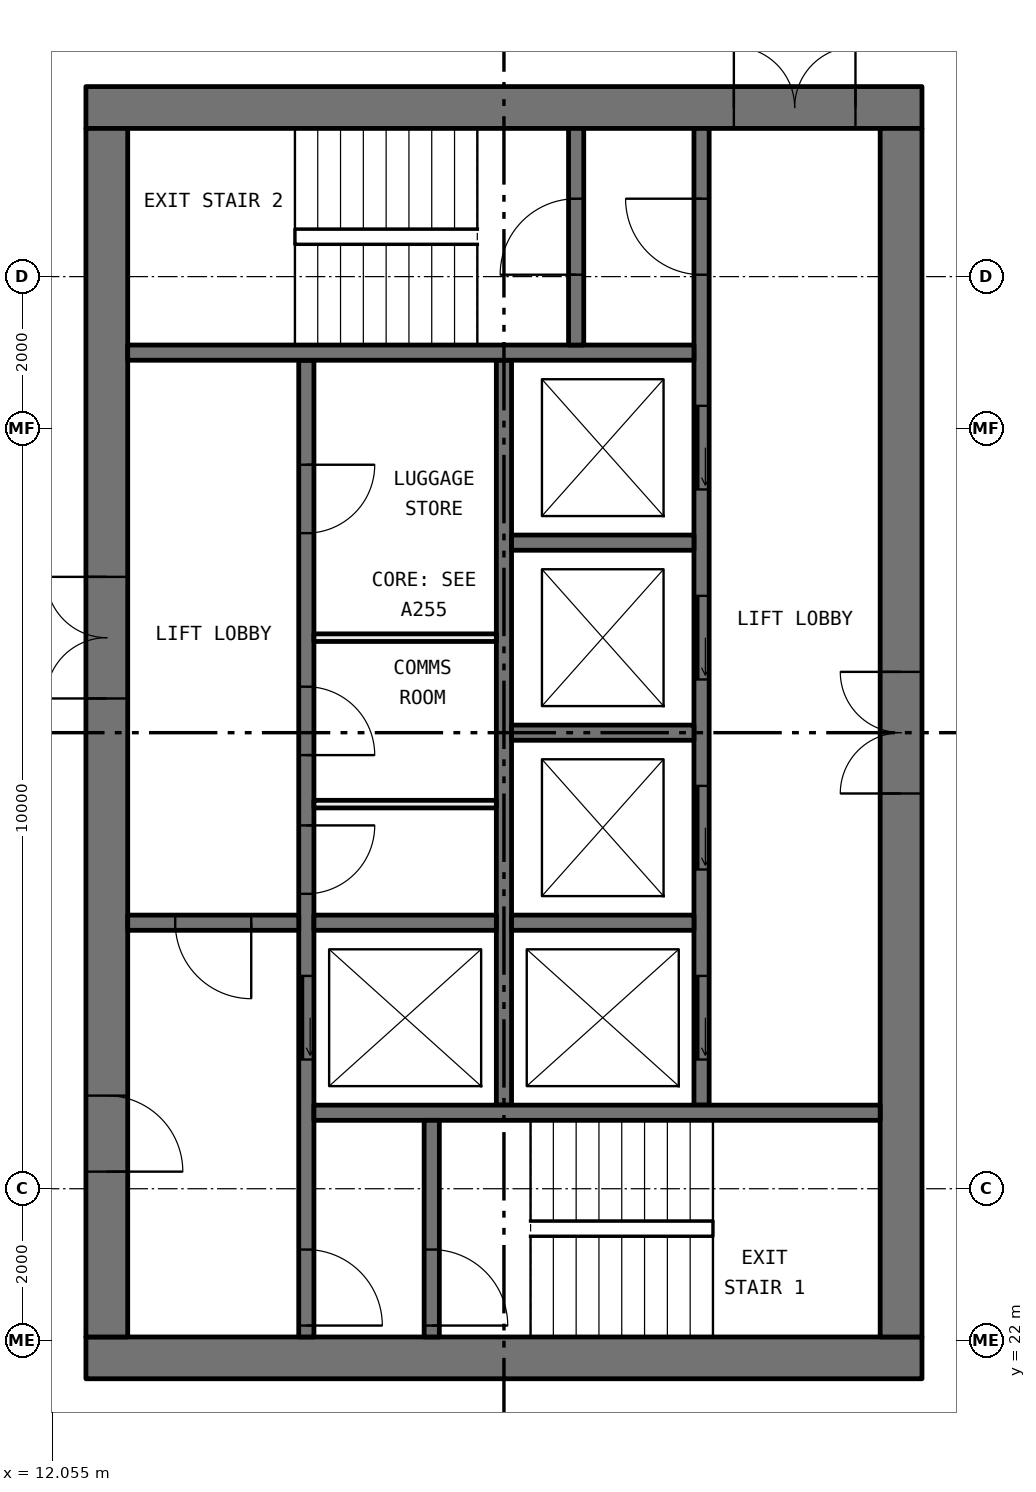
"""IFC4 building model, lengths in metres.
Left out: names, types, materials, properties, quantities, classifications, styles, units other than length and angle.
Written with IfcOpenShell. Run it as: python <this file> out.ifc"""

import sys

from ifc_helpers import new_model, si_unit, direction, frame, frame_2d, origin, place, context, subcontext, project, spatial, rectangle, extrude, element, fill, save


model = new_model("IFC4")
c1 = context("Model", 3, precision=1e-05, world=origin(), true_north=direction((0.0, 1.0)))
c2 = subcontext(c1, "Body", "Model", "MODEL_VIEW")
j1 = project(units=[si_unit("LENGTHUNIT", "METRE"), si_unit("PLANEANGLEUNIT", "RADIAN")], contexts=[c1])
p1 = place(None, origin())
s1 = spatial("IfcSite", under=j1, at=p1, CompositionType="ELEMENT")
p2 = place(p1, origin())
s2 = spatial("IfcBuilding", under=s1, at=p2, CompositionType="ELEMENT")
p3 = place(p2, frame((0.0, 0.0, 203.1)))
s3 = spatial("IfcBuildingStorey", under=s2, at=p3, CompositionType="ELEMENT", Elevation=203.1)
p4 = place(p3, frame((12.5, 21.775, 0.0), z_axis=(0.0, 0.0, 1.0), x_axis=(1.0, 0.0, 0.0)))
e1 = element("IfcWall", 1, at=p4, inside=s3, PredefinedType="SHEAR", context=c2, shape_type="SweptSolid", body=[
    extrude(rectangle(XDim=11.0, YDim=0.55, at=frame_2d((5.5, 0.0))), origin(), (0.0, 0.0, 1.0), 3.05),
])
p5 = place(p3, frame((12.5, 38.225, 0.0), z_axis=(0.0, 0.0, 1.0), x_axis=(1.0, 0.0, 0.0)))
e2 = element("IfcWall", 2, at=p5, inside=s3, PredefinedType="SHEAR", context=c2, shape_type="SweptSolid", body=[
    extrude(rectangle(XDim=11.0, YDim=0.55, at=frame_2d((5.5, 0.0))), origin(), (0.0, 0.0, 1.0), 3.05),
])
p6 = place(p5, frame((8.525, 0.0, 0.0)))
e3 = element("IfcOpeningElement", 3, at=p6, cuts=e2, PredefinedType="OPENING", context=c2, shape_type="SweptSolid", body=[
    extrude(rectangle(XDim=1.6, YDim=2.1, at=frame_2d((0.8, 1.05))), frame((0.0, 0.285, 0.0), z_axis=(0.0, -1.0, 0.0), x_axis=(1.0, 0.0, 0.0)), (0.0, 0.0, 1.0), 0.57),
])
p7 = place(p3, frame((12.775, 22.05, 0.0), z_axis=(0.0, 0.0, 1.0), x_axis=(0.0, 1.0, 0.0)))
e4 = element("IfcWall", 4, at=p7, inside=s3, PredefinedType="SHEAR", context=c2, shape_type="SweptSolid", body=[
    extrude(rectangle(XDim=15.9, YDim=0.55, at=frame_2d((7.95, 0.0))), origin(), (0.0, 0.0, 1.0), 3.05),
])
p8 = place(p7, frame((8.4, 0.0, 0.0)))
e5 = element("IfcOpeningElement", 5, at=p8, cuts=e4, PredefinedType="OPENING", context=c2, shape_type="SweptSolid", body=[
    extrude(rectangle(XDim=1.6, YDim=2.1, at=frame_2d((0.8, 1.05))), frame((0.0, 0.285, 0.0), z_axis=(0.0, -1.0, 0.0), x_axis=(1.0, 0.0, 0.0)), (0.0, 0.0, 1.0), 0.57),
])
p9 = place(p7, frame((2.175, 0.0, 0.0)))
e6 = element("IfcOpeningElement", 6, at=p9, cuts=e4, PredefinedType="OPENING", context=c2, shape_type="SweptSolid", body=[
    extrude(rectangle(XDim=1.0, YDim=2.1, at=frame_2d((0.5, 1.05))), frame((0.0, 0.285, 0.0), z_axis=(0.0, -1.0, 0.0), x_axis=(1.0, 0.0, 0.0)), (0.0, 0.0, 1.0), 0.57),
])
p10 = place(p3, frame((23.225, 22.05, 0.0), z_axis=(0.0, 0.0, 1.0), x_axis=(0.0, 1.0, 0.0)))
e7 = element("IfcWall", 7, at=p10, inside=s3, PredefinedType="SHEAR", context=c2, shape_type="SweptSolid", body=[
    extrude(rectangle(XDim=15.9, YDim=0.55, at=frame_2d((7.95, 0.0))), origin(), (0.0, 0.0, 1.0), 3.05),
])
p11 = place(p10, frame((7.15, 0.0, 0.0)))
e8 = element("IfcOpeningElement", 8, at=p11, cuts=e7, PredefinedType="OPENING", context=c2, shape_type="SweptSolid", body=[
    extrude(rectangle(XDim=1.6, YDim=2.1, at=frame_2d((0.8, 1.05))), frame((0.0, 0.285, 0.0), z_axis=(0.0, -1.0, 0.0), x_axis=(1.0, 0.0, 0.0)), (0.0, 0.0, 1.0), 0.57),
])
p12 = place(p3, frame((15.4, 22.05, 0.0), z_axis=(0.0, 0.0, 1.0), x_axis=(0.0, 1.0, 0.0)))
e9 = element("IfcWall", 9, at=p12, inside=s3, PredefinedType="SOLIDWALL", context=c2, shape_type="SweptSolid", body=[
    extrude(rectangle(XDim=12.85, YDim=0.2, at=frame_2d((6.425, 0.0))), origin(), (0.0, 0.0, 1.0), 3.05),
])
p13 = place(p12, frame((3.65, 0.0, 0.0)))
e10 = element("IfcOpeningElement", 10, at=p13, cuts=e9, PredefinedType="OPENING", context=c2, shape_type="SweptSolid", body=[
    extrude(rectangle(XDim=1.1, YDim=2.1, at=frame_2d((0.55, 1.05))), frame((0.0, 0.11, 0.0), z_axis=(0.0, -1.0, 0.0), x_axis=(1.0, 0.0, 0.0)), (0.0, 0.0, 1.0), 0.22),
])
p14 = place(p12, frame((0.15, 0.0, 0.0)))
e11 = element("IfcOpeningElement", 11, at=p14, cuts=e9, PredefinedType="OPENING", context=c2, shape_type="SweptSolid", body=[
    extrude(rectangle(XDim=1.0, YDim=2.1, at=frame_2d((0.5, 1.05))), frame((0.0, 0.11, 0.0), z_axis=(0.0, -1.0, 0.0), x_axis=(1.0, 0.0, 0.0)), (0.0, 0.0, 1.0), 0.22),
])
p15 = place(p12, frame((5.83, 0.0, 0.0)))
e12 = element("IfcOpeningElement", 12, at=p15, cuts=e9, PredefinedType="OPENING", context=c2, shape_type="SweptSolid", body=[
    extrude(rectangle(XDim=0.9, YDim=2.1, at=frame_2d((0.45, 1.05))), frame((0.0, 0.11, 0.0), z_axis=(0.0, -1.0, 0.0), x_axis=(1.0, 0.0, 0.0)), (0.0, 0.0, 1.0), 0.22),
])
p16 = place(p12, frame((7.655, 0.0, 0.0)))
e13 = element("IfcOpeningElement", 13, at=p16, cuts=e9, PredefinedType="OPENING", context=c2, shape_type="SweptSolid", body=[
    extrude(rectangle(XDim=0.9, YDim=2.1, at=frame_2d((0.45, 1.05))), frame((0.0, 0.11, 0.0), z_axis=(0.0, -1.0, 0.0), x_axis=(1.0, 0.0, 0.0)), (0.0, 0.0, 1.0), 0.22),
])
p17 = place(p12, frame((10.575, 0.0, 0.0)))
e14 = element("IfcOpeningElement", 14, at=p17, cuts=e9, PredefinedType="OPENING", context=c2, shape_type="SweptSolid", body=[
    extrude(rectangle(XDim=0.9, YDim=2.1, at=frame_2d((0.45, 1.05))), frame((0.0, 0.11, 0.0), z_axis=(0.0, -1.0, 0.0), x_axis=(1.0, 0.0, 0.0)), (0.0, 0.0, 1.0), 0.22),
])
p18 = place(p3, frame((20.6, 25.1, 0.0), z_axis=(0.0, 0.0, 1.0), x_axis=(0.0, 1.0, 0.0)))
e15 = element("IfcWall", 15, at=p18, inside=s3, PredefinedType="SOLIDWALL", context=c2, shape_type="SweptSolid", body=[
    extrude(rectangle(XDim=12.85, YDim=0.2, at=frame_2d((6.425, 0.0))), origin(), (0.0, 0.0, 1.0), 3.05),
])
p19 = place(p18, frame((0.6, 0.0, 0.0)))
e16 = element("IfcOpeningElement", 16, at=p19, cuts=e15, PredefinedType="OPENING", context=c2, shape_type="SweptSolid", body=[
    extrude(rectangle(XDim=1.1, YDim=2.1, at=frame_2d((0.55, 1.05))), frame((0.0, 0.11, 0.0), z_axis=(0.0, -1.0, 0.0), x_axis=(1.0, 0.0, 0.0)), (0.0, 0.0, 1.0), 0.22),
])
p20 = place(p18, frame((3.1, 0.0, 0.0)))
e17 = element("IfcOpeningElement", 17, at=p20, cuts=e15, PredefinedType="OPENING", context=c2, shape_type="SweptSolid", body=[
    extrude(rectangle(XDim=1.1, YDim=2.1, at=frame_2d((0.55, 1.05))), frame((0.0, 0.11, 0.0), z_axis=(0.0, -1.0, 0.0), x_axis=(1.0, 0.0, 0.0)), (0.0, 0.0, 1.0), 0.22),
])
p21 = place(p18, frame((5.6, 0.0, 0.0)))
e18 = element("IfcOpeningElement", 18, at=p21, cuts=e15, PredefinedType="OPENING", context=c2, shape_type="SweptSolid", body=[
    extrude(rectangle(XDim=1.1, YDim=2.1, at=frame_2d((0.55, 1.05))), frame((0.0, 0.11, 0.0), z_axis=(0.0, -1.0, 0.0), x_axis=(1.0, 0.0, 0.0)), (0.0, 0.0, 1.0), 0.22),
])
p22 = place(p18, frame((8.1, 0.0, 0.0)))
e19 = element("IfcOpeningElement", 19, at=p22, cuts=e15, PredefinedType="OPENING", context=c2, shape_type="SweptSolid", body=[
    extrude(rectangle(XDim=1.1, YDim=2.1, at=frame_2d((0.55, 1.05))), frame((0.0, 0.11, 0.0), z_axis=(0.0, -1.0, 0.0), x_axis=(1.0, 0.0, 0.0)), (0.0, 0.0, 1.0), 0.22),
])
p23 = place(p18, frame((10.925, 0.0, 0.0)))
e20 = element("IfcOpeningElement", 20, at=p23, cuts=e15, PredefinedType="OPENING", context=c2, shape_type="SweptSolid", body=[
    extrude(rectangle(XDim=1.0, YDim=2.1, at=frame_2d((0.5, 1.05))), frame((0.0, 0.11, 0.0), z_axis=(0.0, -1.0, 0.0), x_axis=(1.0, 0.0, 0.0)), (0.0, 0.0, 1.0), 0.22),
])
p24 = place(p3, frame((18.0, 25.1, 0.0), z_axis=(0.0, 0.0, 1.0), x_axis=(0.0, 1.0, 0.0)))
e21 = element("IfcWall", 21, at=p24, inside=s3, PredefinedType="SOLIDWALL", context=c2, shape_type="SweptSolid", body=[
    extrude(rectangle(XDim=9.8, YDim=0.2, at=frame_2d((4.9, 0.0))), origin(), (0.0, 0.0, 1.0), 3.05),
])
for number, where, z_axis, x_axis in (
    (22, (15.5, 25.0, 0.0), (0.0, 0.0, 1.0), (1.0, 0.0, 0.0)),
    (23, (13.05, 35.0, 0.0), (0.0, 0.0, 1.0), (1.0, 0.0, 0.0)),
):
    element("IfcWall", number, at=place(p3, frame(where, z_axis=z_axis, x_axis=x_axis)), inside=s3, PredefinedType="SOLIDWALL", context=c2, shape_type="SweptSolid", body=[
        extrude(rectangle(XDim=7.45, YDim=0.2, at=frame_2d((3.725, 0.0))), origin(), (0.0, 0.0, 1.0), 3.05),
    ])
p25 = place(p3, frame((13.05, 27.5, 0.0), z_axis=(0.0, 0.0, 1.0), x_axis=(1.0, 0.0, 0.0)))
e24 = element("IfcWall", 24, at=p25, inside=s3, PredefinedType="SOLIDWALL", context=c2, shape_type="SweptSolid", body=[
    extrude(rectangle(XDim=2.25, YDim=0.2, at=frame_2d((1.125, 0.0))), origin(), (0.0, 0.0, 1.0), 3.05),
])
p26 = place(p25, frame((0.625, 0.0, 0.0)))
e25 = element("IfcOpeningElement", 25, at=p26, cuts=e24, PredefinedType="OPENING", context=c2, shape_type="SweptSolid", body=[
    extrude(rectangle(XDim=1.0, YDim=2.1, at=frame_2d((0.5, 1.05))), frame((0.0, 0.11, 0.0), z_axis=(0.0, -1.0, 0.0), x_axis=(1.0, 0.0, 0.0)), (0.0, 0.0, 1.0), 0.22),
])
p27 = place(p3, frame((17.05, 22.05, 0.0), z_axis=(0.0, 0.0, 1.0), x_axis=(0.0, 1.0, 0.0)))
e26 = element("IfcWall", 26, at=p27, inside=s3, PredefinedType="SOLIDWALL", context=c2, shape_type="SweptSolid", body=[
    extrude(rectangle(XDim=2.85, YDim=0.2, at=frame_2d((1.425, 0.0))), origin(), (0.0, 0.0, 1.0), 3.05),
])
p28 = place(p27, frame((0.15, 0.0, 0.0)))
e27 = element("IfcOpeningElement", 27, at=p28, cuts=e26, PredefinedType="OPENING", context=c2, shape_type="SweptSolid", body=[
    extrude(rectangle(XDim=1.0, YDim=2.1, at=frame_2d((0.5, 1.05))), frame((0.0, 0.11, 0.0), z_axis=(0.0, -1.0, 0.0), x_axis=(1.0, 0.0, 0.0)), (0.0, 0.0, 1.0), 0.22),
])
p29 = place(p3, frame((18.95, 35.1, 0.0), z_axis=(0.0, 0.0, 1.0), x_axis=(0.0, 1.0, 0.0)))
e28 = element("IfcWall", 28, at=p29, inside=s3, PredefinedType="SOLIDWALL", context=c2, shape_type="SweptSolid", body=[
    extrude(rectangle(XDim=2.85, YDim=0.2, at=frame_2d((1.425, 0.0))), origin(), (0.0, 0.0, 1.0), 3.05),
])
p30 = place(p29, frame((0.925, 0.0, 0.0)))
e29 = element("IfcOpeningElement", 29, at=p30, cuts=e28, PredefinedType="OPENING", context=c2, shape_type="SweptSolid", body=[
    extrude(rectangle(XDim=1.0, YDim=2.1, at=frame_2d((0.5, 1.05))), frame((0.0, 0.11, 0.0), z_axis=(0.0, -1.0, 0.0), x_axis=(1.0, 0.0, 0.0)), (0.0, 0.0, 1.0), 0.22),
])
for number, where, z_axis, x_axis in (
    (30, (15.5, 27.5, 0.0), (0.0, 0.0, 1.0), (1.0, 0.0, 0.0)),
    (31, (18.1, 27.5, 0.0), (0.0, 0.0, 1.0), (1.0, 0.0, 0.0)),
    (32, (18.1, 30.0, 0.0), (0.0, 0.0, 1.0), (1.0, 0.0, 0.0)),
    (33, (18.1, 32.5, 0.0), (0.0, 0.0, 1.0), (1.0, 0.0, 0.0)),
):
    element("IfcWall", number, at=place(p3, frame(where, z_axis=z_axis, x_axis=x_axis)), inside=s3, PredefinedType="SOLIDWALL", context=c2, shape_type="SweptSolid", body=[
        extrude(rectangle(XDim=2.4, YDim=0.2, at=frame_2d((1.2, 0.0))), origin(), (0.0, 0.0, 1.0), 3.05),
    ])
for number, where, z_axis, x_axis in (
    (34, (15.5, 29.06, 0.0), (0.0, 0.0, 1.0), (1.0, 0.0, 0.0)),
    (35, (15.5, 31.25, 0.0), (0.0, 0.0, 1.0), (1.0, 0.0, 0.0)),
):
    element("IfcWall", number, at=place(p3, frame(where, z_axis=z_axis, x_axis=x_axis)), inside=s3, PredefinedType="PARTITIONING", context=c2, shape_type="SweptSolid", body=[
        extrude(rectangle(XDim=2.4, YDim=0.1, at=frame_2d((1.2, 0.0))), origin(), (0.0, 0.0, 1.0), 3.05),
    ])
p31 = place(p19, origin())
e36 = element("IfcDoor", 36, at=p31, inside=s3, OperationType="SLIDING_TO_LEFT", PredefinedType="DOOR", context=c2, shape_type="SweptSolid", body=[
    extrude(rectangle(XDim=1.1, YDim=2.1, at=frame_2d((0.55, 1.05))), frame((0.0, 0.025, 0.0), z_axis=(0.0, -1.0, 0.0), x_axis=(1.0, 0.0, 0.0)), (0.0, 0.0, 1.0), 0.05),
])
fill(e16, e36)
p32 = place(p20, origin())
e37 = element("IfcDoor", 37, at=p32, inside=s3, OperationType="SLIDING_TO_LEFT", PredefinedType="DOOR", context=c2, shape_type="SweptSolid", body=[
    extrude(rectangle(XDim=1.1, YDim=2.1, at=frame_2d((0.55, 1.05))), frame((0.0, 0.025, 0.0), z_axis=(0.0, -1.0, 0.0), x_axis=(1.0, 0.0, 0.0)), (0.0, 0.0, 1.0), 0.05),
])
fill(e17, e37)
p33 = place(p21, origin())
e38 = element("IfcDoor", 38, at=p33, inside=s3, OperationType="SLIDING_TO_LEFT", PredefinedType="DOOR", context=c2, shape_type="SweptSolid", body=[
    extrude(rectangle(XDim=1.1, YDim=2.1, at=frame_2d((0.55, 1.05))), frame((0.0, 0.025, 0.0), z_axis=(0.0, -1.0, 0.0), x_axis=(1.0, 0.0, 0.0)), (0.0, 0.0, 1.0), 0.05),
])
fill(e18, e38)
p34 = place(p22, origin())
e39 = element("IfcDoor", 39, at=p34, inside=s3, OperationType="SLIDING_TO_LEFT", PredefinedType="DOOR", context=c2, shape_type="SweptSolid", body=[
    extrude(rectangle(XDim=1.1, YDim=2.1, at=frame_2d((0.55, 1.05))), frame((0.0, 0.025, 0.0), z_axis=(0.0, -1.0, 0.0), x_axis=(1.0, 0.0, 0.0)), (0.0, 0.0, 1.0), 0.05),
])
fill(e19, e39)
p35 = place(p13, origin())
e40 = element("IfcDoor", 40, at=p35, inside=s3, OperationType="SLIDING_TO_LEFT", PredefinedType="DOOR", context=c2, shape_type="SweptSolid", body=[
    extrude(rectangle(XDim=1.1, YDim=2.1, at=frame_2d((0.55, 1.05))), frame((0.0, 0.025, 0.0), z_axis=(0.0, -1.0, 0.0), x_axis=(1.0, 0.0, 0.0)), (0.0, 0.0, 1.0), 0.05),
])
fill(e10, e40)
p36 = place(p28, frame((1.0, 0.0, 0.0), x_axis=(-1.0, 0.0, 0.0)))
e41 = element("IfcDoor", 41, at=p36, inside=s3, OperationType="SINGLE_SWING_LEFT", PredefinedType="DOOR", context=c2, shape_type="SweptSolid", body=[
    extrude(rectangle(XDim=1.0, YDim=2.1, at=frame_2d((0.5, 1.05))), frame((0.0, 0.025, 0.0), z_axis=(0.0, -1.0, 0.0), x_axis=(1.0, 0.0, 0.0)), (0.0, 0.0, 1.0), 0.05),
])
fill(e27, e41)
p37 = place(p14, frame((1.0, 0.0, 0.0), x_axis=(-1.0, 0.0, 0.0)))
e42 = element("IfcDoor", 42, at=p37, inside=s3, OperationType="SINGLE_SWING_LEFT", PredefinedType="DOOR", context=c2, shape_type="SweptSolid", body=[
    extrude(rectangle(XDim=1.0, YDim=2.1, at=frame_2d((0.5, 1.05))), frame((0.0, 0.025, 0.0), z_axis=(0.0, -1.0, 0.0), x_axis=(1.0, 0.0, 0.0)), (0.0, 0.0, 1.0), 0.05),
])
fill(e11, e42)
p38 = place(p23, origin())
e43 = element("IfcDoor", 43, at=p38, inside=s3, OperationType="SINGLE_SWING_LEFT", PredefinedType="DOOR", context=c2, shape_type="SweptSolid", body=[
    extrude(rectangle(XDim=1.0, YDim=2.1, at=frame_2d((0.5, 1.05))), frame((0.0, 0.025, 0.0), z_axis=(0.0, -1.0, 0.0), x_axis=(1.0, 0.0, 0.0)), (0.0, 0.0, 1.0), 0.05),
])
fill(e20, e43)
p39 = place(p30, origin())
e44 = element("IfcDoor", 44, at=p39, inside=s3, OperationType="SINGLE_SWING_RIGHT", PredefinedType="DOOR", context=c2, shape_type="SweptSolid", body=[
    extrude(rectangle(XDim=1.0, YDim=2.1, at=frame_2d((0.5, 1.05))), frame((0.0, 0.025, 0.0), z_axis=(0.0, -1.0, 0.0), x_axis=(1.0, 0.0, 0.0)), (0.0, 0.0, 1.0), 0.05),
])
fill(e29, e44)
p40 = place(p26, frame((1.0, 0.0, 0.0), x_axis=(-1.0, 0.0, 0.0)))
e45 = element("IfcDoor", 45, at=p40, inside=s3, OperationType="SINGLE_SWING_RIGHT", PredefinedType="DOOR", context=c2, shape_type="SweptSolid", body=[
    extrude(rectangle(XDim=1.0, YDim=2.1, at=frame_2d((0.5, 1.05))), frame((0.0, 0.025, 0.0), z_axis=(0.0, -1.0, 0.0), x_axis=(1.0, 0.0, 0.0)), (0.0, 0.0, 1.0), 0.05),
])
fill(e25, e45)
p41 = place(p8, origin())
e46 = element("IfcDoor", 46, at=p41, inside=s3, OperationType="DOUBLE_DOOR_SINGLE_SWING", PredefinedType="DOOR", context=c2, shape_type="SweptSolid", body=[
    extrude(rectangle(XDim=1.6, YDim=2.1, at=frame_2d((0.8, 1.05))), frame((0.0, 0.025, 0.0), z_axis=(0.0, -1.0, 0.0), x_axis=(1.0, 0.0, 0.0)), (0.0, 0.0, 1.0), 0.05),
])
fill(e5, e46)
p42 = place(p9, frame((1.0, 0.0, 0.0), x_axis=(-1.0, 0.0, 0.0)))
e47 = element("IfcDoor", 47, at=p42, inside=s3, OperationType="SINGLE_SWING_LEFT", PredefinedType="DOOR", context=c2, shape_type="SweptSolid", body=[
    extrude(rectangle(XDim=1.0, YDim=2.1, at=frame_2d((0.5, 1.05))), frame((0.0, 0.025, 0.0), z_axis=(0.0, -1.0, 0.0), x_axis=(1.0, 0.0, 0.0)), (0.0, 0.0, 1.0), 0.05),
])
fill(e6, e47)
p43 = place(p6, origin())
e48 = element("IfcDoor", 48, at=p43, inside=s3, OperationType="DOUBLE_DOOR_SINGLE_SWING", PredefinedType="DOOR", context=c2, shape_type="SweptSolid", body=[
    extrude(rectangle(XDim=1.6, YDim=2.1, at=frame_2d((0.8, 1.05))), frame((0.0, 0.025, 0.0), z_axis=(0.0, -1.0, 0.0), x_axis=(1.0, 0.0, 0.0)), (0.0, 0.0, 1.0), 0.05),
])
fill(e3, e48)
p44 = place(p11, origin())
e49 = element("IfcDoor", 49, at=p44, inside=s3, OperationType="DOUBLE_DOOR_SINGLE_SWING", PredefinedType="DOOR", context=c2, shape_type="SweptSolid", body=[
    extrude(rectangle(XDim=1.6, YDim=2.1, at=frame_2d((0.8, 1.05))), frame((0.0, 0.025, 0.0), z_axis=(0.0, -1.0, 0.0), x_axis=(1.0, 0.0, 0.0)), (0.0, 0.0, 1.0), 0.05),
])
fill(e8, e49)
p45 = place(p15, frame((0.9, 0.0, 0.0), x_axis=(-1.0, 0.0, 0.0)))
e50 = element("IfcDoor", 50, at=p45, inside=s3, OperationType="SINGLE_SWING_RIGHT", PredefinedType="DOOR", context=c2, shape_type="SweptSolid", body=[
    extrude(rectangle(XDim=0.9, YDim=2.1, at=frame_2d((0.45, 1.05))), frame((0.0, 0.025, 0.0), z_axis=(0.0, -1.0, 0.0), x_axis=(1.0, 0.0, 0.0)), (0.0, 0.0, 1.0), 0.05),
])
fill(e12, e50)
p46 = place(p16, frame((0.9, 0.0, 0.0), x_axis=(-1.0, 0.0, 0.0)))
e51 = element("IfcDoor", 51, at=p46, inside=s3, OperationType="SINGLE_SWING_LEFT", PredefinedType="DOOR", context=c2, shape_type="SweptSolid", body=[
    extrude(rectangle(XDim=0.9, YDim=2.1, at=frame_2d((0.45, 1.05))), frame((0.0, 0.025, 0.0), z_axis=(0.0, -1.0, 0.0), x_axis=(1.0, 0.0, 0.0)), (0.0, 0.0, 1.0), 0.05),
])
fill(e13, e51)
p47 = place(p17, frame((0.9, 0.0, 0.0), x_axis=(-1.0, 0.0, 0.0)))
e52 = element("IfcDoor", 52, at=p47, inside=s3, OperationType="SINGLE_SWING_RIGHT", PredefinedType="DOOR", context=c2, shape_type="SweptSolid", body=[
    extrude(rectangle(XDim=0.9, YDim=2.1, at=frame_2d((0.45, 1.05))), frame((0.0, 0.025, 0.0), z_axis=(0.0, -1.0, 0.0), x_axis=(1.0, 0.0, 0.0)), (0.0, 0.0, 1.0), 0.05),
])
fill(e14, e52)
save(model, sys.argv[1])
